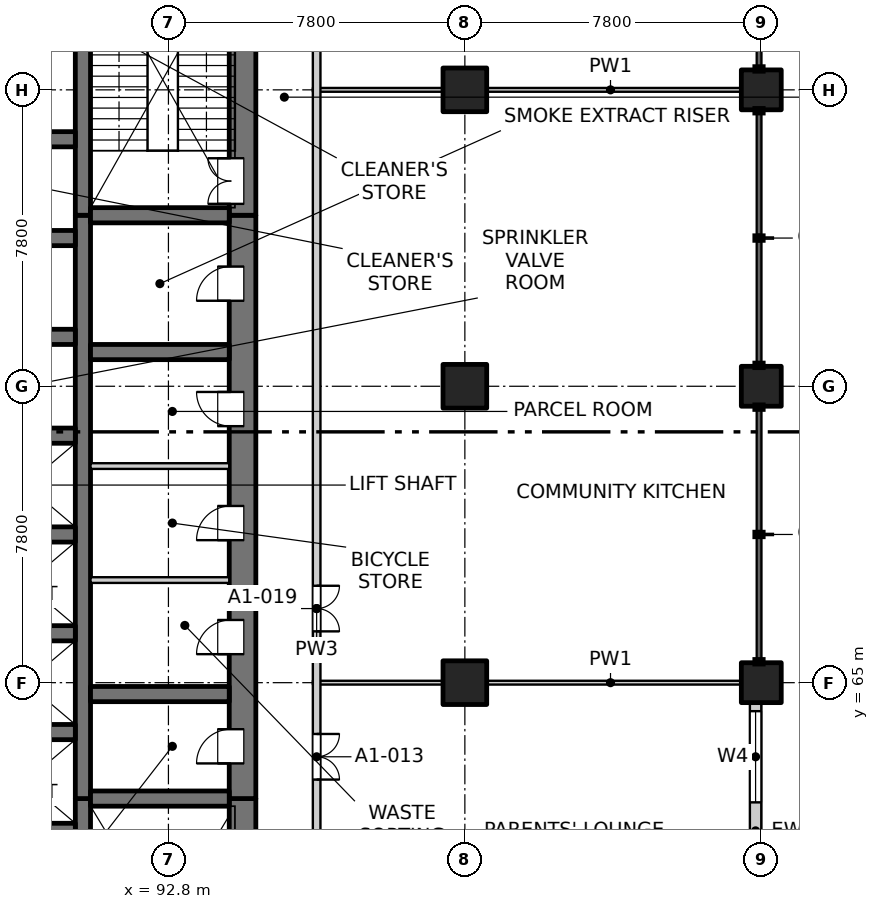
"""IFC4 building model, lengths in metres.
Left out: names, types, materials, properties, quantities, classifications, styles, units other than length and angle.
Written with IfcOpenShell. Run it as: python <this file> out.ifc"""

import sys

from ifc_helpers import new_model, si_unit, direction, frame, frame_2d, origin, origin_2d, place, context, subcontext, project, spatial, rectangle, extrude, element, fill, save


model = new_model("IFC4")
c1 = context("Model", 3, precision=1e-05, world=origin(), true_north=direction((0.0, 1.0)))
c2 = subcontext(c1, "Body", "Model", "MODEL_VIEW")
j1 = project(units=[si_unit("LENGTHUNIT", "METRE"), si_unit("PLANEANGLEUNIT", "RADIAN")], contexts=[c1])
p1 = place(None, origin())
s1 = spatial("IfcSite", under=j1, at=p1, CompositionType="ELEMENT")
p2 = place(p1, origin())
s2 = spatial("IfcBuilding", under=s1, at=p2, CompositionType="ELEMENT")
p3 = place(p2, frame((0.0, 0.0, 15.0)))
s3 = spatial("IfcBuildingStorey", under=s2, at=p3, CompositionType="ELEMENT", Elevation=15.0)
for number, where, z_axis, x_axis in (
    (1, (108.4, 65.0, -0.35), (0.0, 0.0, 1.0), (1.0, 0.0, 0.0)),
    (2, (108.4, 72.8, -0.35), (0.0, 0.0, 1.0), (1.0, 0.0, 0.0)),
    (3, (108.4, 80.6, -0.35), (0.0, 0.0, 1.0), (1.0, 0.0, 0.0)),
):
    element("IfcColumn", number, at=place(p3, frame(where, z_axis=z_axis, x_axis=x_axis)), inside=s3, PredefinedType="COLUMN", context=c2, shape_type="SweptSolid", body=[
        extrude(rectangle(XDim=1.05, YDim=1.05, at=origin_2d()), origin(), (0.0, 0.0, 1.0), 4.6),
    ])
for number, where, z_axis, x_axis in (
    (4, (100.6, 65.0, -0.35), (0.0, 0.0, 1.0), (1.0, 0.0, 0.0)),
    (5, (100.6, 72.8, -0.35), (0.0, 0.0, 1.0), (1.0, 0.0, 0.0)),
    (6, (100.6, 80.6, -0.35), (0.0, 0.0, 1.0), (1.0, 0.0, 0.0)),
):
    element("IfcColumn", number, at=place(p3, frame(where, z_axis=z_axis, x_axis=x_axis)), inside=s3, PredefinedType="COLUMN", context=c2, shape_type="SweptSolid", body=[
        extrude(rectangle(XDim=1.15, YDim=1.15, at=origin_2d()), origin(), (0.0, 0.0, 1.0), 4.6),
    ])
p4 = place(p3, frame((94.75, 54.9, -0.35), z_axis=(0.0, 0.0, 1.0), x_axis=(0.0, 1.0, 0.0)))
e7 = element("IfcWall", 7, at=p4, inside=s3, PredefinedType="SOLIDWALL", context=c2, shape_type="SweptSolid", body=[
    extrude(rectangle(XDim=7.05, YDim=0.7, at=frame_2d((3.525, 0.0))), origin(), (0.0, 0.0, 1.0), 4.6),
])
p5 = place(p4, frame((0.75, 0.0, 0.35)))
e8 = element("IfcOpeningElement", 8, at=p5, cuts=e7, PredefinedType="OPENING", context=c2, shape_type="SweptSolid", body=[
    extrude(rectangle(XDim=1.2, YDim=2.1, at=frame_2d((0.6, 1.05))), frame((0.0, 0.36, 0.0), z_axis=(0.0, -1.0, 0.0), x_axis=(1.0, 0.0, 0.0)), (0.0, 0.0, 1.0), 0.72),
])
p6 = place(p3, frame((94.75, 61.95, -0.35), z_axis=(0.0, 0.0, 1.0), x_axis=(0.0, 1.0, 0.0)))
e9 = element("IfcWall", 9, at=p6, inside=s3, PredefinedType="SOLIDWALL", context=c2, shape_type="SweptSolid", body=[
    extrude(rectangle(XDim=15.35, YDim=0.7, at=frame_2d((7.675, 0.0))), origin(), (0.0, 0.0, 1.0), 4.6),
])
p7 = place(p6, frame((0.925, 0.0, 0.35)))
e10 = element("IfcOpeningElement", 10, at=p7, cuts=e9, PredefinedType="OPENING", context=c2, shape_type="SweptSolid", body=[
    extrude(rectangle(XDim=0.9, YDim=2.1, at=frame_2d((0.45, 1.05))), frame((0.0, 0.36, 0.0), z_axis=(0.0, -1.0, 0.0), x_axis=(1.0, 0.0, 0.0)), (0.0, 0.0, 1.0), 0.72),
])
p8 = place(p6, frame((3.8, 0.0, 0.35)))
e11 = element("IfcOpeningElement", 11, at=p8, cuts=e9, PredefinedType="OPENING", context=c2, shape_type="SweptSolid", body=[
    extrude(rectangle(XDim=0.9, YDim=2.1, at=frame_2d((0.45, 1.05))), frame((0.0, 0.36, 0.0), z_axis=(0.0, -1.0, 0.0), x_axis=(1.0, 0.0, 0.0)), (0.0, 0.0, 1.0), 0.72),
])
p9 = place(p6, frame((6.8, 0.0, 0.35)))
e12 = element("IfcOpeningElement", 12, at=p9, cuts=e9, PredefinedType="OPENING", context=c2, shape_type="SweptSolid", body=[
    extrude(rectangle(XDim=0.9, YDim=2.1, at=frame_2d((0.45, 1.05))), frame((0.0, 0.36, 0.0), z_axis=(0.0, -1.0, 0.0), x_axis=(1.0, 0.0, 0.0)), (0.0, 0.0, 1.0), 0.72),
])
p10 = place(p6, frame((9.8, 0.0, 0.35)))
e13 = element("IfcOpeningElement", 13, at=p10, cuts=e9, PredefinedType="OPENING", context=c2, shape_type="SweptSolid", body=[
    extrude(rectangle(XDim=0.9, YDim=2.1, at=frame_2d((0.45, 1.05))), frame((0.0, 0.36, 0.0), z_axis=(0.0, -1.0, 0.0), x_axis=(1.0, 0.0, 0.0)), (0.0, 0.0, 1.0), 0.72),
])
p11 = place(p6, frame((13.1, 0.0, 0.35)))
e14 = element("IfcOpeningElement", 14, at=p11, cuts=e9, PredefinedType="OPENING", context=c2, shape_type="SweptSolid", body=[
    extrude(rectangle(XDim=0.9, YDim=2.1, at=frame_2d((0.45, 1.05))), frame((0.0, 0.36, 0.0), z_axis=(0.0, -1.0, 0.0), x_axis=(1.0, 0.0, 0.0)), (0.0, 0.0, 1.0), 0.72),
])
p12 = place(p3, frame((94.75, 77.3, -0.35), z_axis=(0.0, 0.0, 1.0), x_axis=(0.0, 1.0, 0.0)))
e15 = element("IfcWall", 15, at=p12, inside=s3, PredefinedType="SOLIDWALL", context=c2, shape_type="SweptSolid", body=[
    extrude(rectangle(XDim=7.55, YDim=0.7, at=frame_2d((3.775, 0.0))), origin(), (0.0, 0.0, 1.0), 4.6),
])
p13 = place(p12, frame((0.3, 0.0, 0.35)))
e16 = element("IfcOpeningElement", 16, at=p13, cuts=e15, PredefinedType="OPENING", context=c2, shape_type="SweptSolid", body=[
    extrude(rectangle(XDim=1.2, YDim=2.1, at=frame_2d((0.6, 1.05))), frame((0.0, 0.36, 0.0), z_axis=(0.0, -1.0, 0.0), x_axis=(1.0, 0.0, 0.0)), (0.0, 0.0, 1.0), 0.72),
])
p14 = place(p3, frame((90.55, 55.6, -0.35), z_axis=(0.0, 0.0, 1.0), x_axis=(0.0, 1.0, 0.0)))
e17 = element("IfcWall", 17, at=p14, inside=s3, PredefinedType="SOLIDWALL", context=c2, shape_type="SweptSolid", body=[
    extrude(rectangle(XDim=6.35, YDim=0.4, at=frame_2d((3.175, 0.0))), origin(), (0.0, 0.0, 1.0), 4.6),
])
p15 = place(p14, frame((0.1, 0.0, 0.35)))
e18 = element("IfcOpeningElement", 18, at=p15, cuts=e17, PredefinedType="OPENING", context=c2, shape_type="SweptSolid", body=[
    extrude(rectangle(XDim=1.2, YDim=2.1, at=frame_2d((0.6, 1.05))), frame((0.0, 0.21, 0.0), z_axis=(0.0, -1.0, 0.0), x_axis=(1.0, 0.0, 0.0)), (0.0, 0.0, 1.0), 0.42),
])
p16 = place(p3, frame((90.55, 61.95, -0.35), z_axis=(0.0, 0.0, 1.0), x_axis=(0.0, 1.0, 0.0)))
e19 = element("IfcWall", 19, at=p16, inside=s3, PredefinedType="SOLIDWALL", context=c2, shape_type="SweptSolid", body=[
    extrude(rectangle(XDim=15.35, YDim=0.4, at=frame_2d((7.675, 0.0))), origin(), (0.0, 0.0, 1.0), 4.6),
])
p17 = place(p3, frame((90.55, 77.3, -0.35), z_axis=(0.0, 0.0, 1.0), x_axis=(0.0, 1.0, 0.0)))
e20 = element("IfcWall", 20, at=p17, inside=s3, PredefinedType="SOLIDWALL", context=c2, shape_type="SweptSolid", body=[
    extrude(rectangle(XDim=6.85, YDim=0.4, at=frame_2d((3.425, 0.0))), origin(), (0.0, 0.0, 1.0), 4.6),
])
for number, where, z_axis, x_axis in (
    (21, (87.35, 61.1, -0.35), (0.0, 0.0, 1.0), (1.0, 0.0, 0.0)),
    (22, (87.35, 63.7, -0.35), (0.0, 0.0, 1.0), (1.0, 0.0, 0.0)),
    (23, (87.35, 66.3, -0.35), (0.0, 0.0, 1.0), (1.0, 0.0, 0.0)),
    (24, (87.35, 68.9, -0.35), (0.0, 0.0, 1.0), (1.0, 0.0, 0.0)),
    (25, (87.35, 71.5, -0.35), (0.0, 0.0, 1.0), (1.0, 0.0, 0.0)),
    (26, (87.35, 74.1, -0.35), (0.0, 0.0, 1.0), (1.0, 0.0, 0.0)),
    (27, (87.35, 76.7, -0.35), (0.0, 0.0, 1.0), (1.0, 0.0, 0.0)),
    (28, (87.35, 79.3, -0.35), (0.0, 0.0, 1.0), (1.0, 0.0, 0.0)),
):
    element("IfcWall", number, at=place(p3, frame(where, z_axis=z_axis, x_axis=x_axis)), inside=s3, PredefinedType="SOLIDWALL", context=c2, shape_type="SweptSolid", body=[
        extrude(rectangle(XDim=3.0, YDim=0.4, at=frame_2d((1.5, 0.0))), origin(), (0.0, 0.0, 1.0), 4.6),
    ])
for number, where, z_axis, x_axis in (
    (29, (90.75, 61.95, -0.35), (0.0, 0.0, 1.0), (1.0, 0.0, 0.0)),
    (30, (90.75, 64.7, -0.35), (0.0, 0.0, 1.0), (1.0, 0.0, 0.0)),
    (31, (90.75, 73.7, -0.35), (0.0, 0.0, 1.0), (1.0, 0.0, 0.0)),
    (32, (90.75, 77.3, -0.35), (0.0, 0.0, 1.0), (1.0, 0.0, 0.0)),
):
    element("IfcWall", number, at=place(p3, frame(where, z_axis=z_axis, x_axis=x_axis)), inside=s3, PredefinedType="SOLIDWALL", context=c2, shape_type="SweptSolid", body=[
        extrude(rectangle(XDim=3.65, YDim=0.4, at=frame_2d((1.825, 0.0))), origin(), (0.0, 0.0, 1.0), 4.6),
    ])
p18 = place(p3, frame((108.25, 57.725, 0.0), z_axis=(0.0, 0.0, 1.0), x_axis=(0.0, 1.0, 0.0)))
e33 = element("IfcWall", 33, at=p18, inside=s3, PredefinedType="SOLIDWALL", context=c2, shape_type="SweptSolid", body=[
    extrude(rectangle(XDim=6.75, YDim=0.3, at=frame_2d((3.375, 0.0))), origin(), (0.0, 0.0, 1.0), 3.8),
])
p19 = place(p18, frame((0.375, 0.0, 0.0)))
e34 = element("IfcOpeningElement", 34, at=p19, cuts=e33, PredefinedType="OPENING", context=c2, shape_type="SweptSolid", body=[
    extrude(rectangle(XDim=2.1, YDim=2.4, at=frame_2d((1.05, 1.2))), frame((0.0, 0.16, 0.0), z_axis=(0.0, -1.0, 0.0), x_axis=(1.0, 0.0, 0.0)), (0.0, 0.0, 1.0), 0.32),
])
p20 = place(p18, frame((4.125, 0.0, 0.6)))
e35 = element("IfcOpeningElement", 35, at=p20, cuts=e33, PredefinedType="OPENING", context=c2, shape_type="SweptSolid", body=[
    extrude(rectangle(XDim=2.4, YDim=2.1, at=frame_2d((1.2, 1.05))), frame((0.0, 0.16, 0.0), z_axis=(0.0, -1.0, 0.0), x_axis=(1.0, 0.0, 0.0)), (0.0, 0.0, 1.0), 0.32),
])
p21 = place(p3, frame((96.6, 65.0, 0.0), z_axis=(0.0, 0.0, 1.0), x_axis=(1.0, 0.0, 0.0)))
e36 = element("IfcWall", 36, at=p21, inside=s3, PredefinedType="PARTITIONING", context=c2, shape_type="SweptSolid", body=[
    extrude(rectangle(XDim=4.0, YDim=0.1, at=frame_2d((2.0, 0.0))), origin(), (0.0, 0.0, 1.0), 4.25),
])
p22 = place(p3, frame((100.6, 65.0, 0.0), z_axis=(0.0, 0.0, 1.0), x_axis=(1.0, 0.0, 0.0)))
e37 = element("IfcWall", 37, at=p22, inside=s3, PredefinedType="PARTITIONING", context=c2, shape_type="SweptSolid", body=[
    extrude(rectangle(XDim=7.665, YDim=0.1, at=frame_2d((3.833, 0.0))), origin(), (0.0, 0.0, 1.0), 3.65),
])
for number, where, z_axis, x_axis in (
    (38, (90.75, 67.7, 0.0), (0.0, 0.0, 1.0), (1.0, 0.0, 0.0)),
    (39, (90.75, 70.7, 0.0), (0.0, 0.0, 1.0), (1.0, 0.0, 0.0)),
):
    element("IfcWall", number, at=place(p3, frame(where, z_axis=z_axis, x_axis=x_axis)), inside=s3, PredefinedType="PARTITIONING", context=c2, shape_type="SweptSolid", body=[
        extrude(rectangle(XDim=3.65, YDim=0.15, at=frame_2d((1.825, 0.0))), origin(), (0.0, 0.0, 1.0), 4.25),
    ])
p23 = place(p3, frame((96.6, 80.6, 0.0), z_axis=(0.0, 0.0, 1.0), x_axis=(1.0, 0.0, 0.0)))
e40 = element("IfcWall", 40, at=p23, inside=s3, PredefinedType="PARTITIONING", context=c2, shape_type="SweptSolid", body=[
    extrude(rectangle(XDim=4.0, YDim=0.1, at=frame_2d((2.0, 0.0))), origin(), (0.0, 0.0, 1.0), 4.25),
])
p24 = place(p3, frame((100.6, 80.6, 0.0), z_axis=(0.0, 0.0, 1.0), x_axis=(1.0, 0.0, 0.0)))
e41 = element("IfcWall", 41, at=p24, inside=s3, PredefinedType="PARTITIONING", context=c2, shape_type="SweptSolid", body=[
    extrude(rectangle(XDim=7.665, YDim=0.1, at=frame_2d((3.833, 0.0))), origin(), (0.0, 0.0, 1.0), 3.65),
])
p25 = place(p3, frame((96.7, 49.5, 0.0), z_axis=(0.0, 0.0, 1.0), x_axis=(0.0, 1.0, 0.0)))
e42 = element("IfcWall", 42, at=p25, inside=s3, PredefinedType="PARTITIONING", context=c2, shape_type="SweptSolid", body=[
    extrude(rectangle(XDim=34.9, YDim=0.2, at=frame_2d((17.45, 0.0))), origin(), (0.0, 0.0, 1.0), 4.25),
])
p26 = place(p25, frame((6.2, 0.0, 0.0)))
e43 = element("IfcOpeningElement", 43, at=p26, cuts=e42, PredefinedType="OPENING", context=c2, shape_type="SweptSolid", body=[
    extrude(rectangle(XDim=1.2, YDim=2.1, at=frame_2d((0.6, 1.05))), frame((0.0, 0.11, 0.0), z_axis=(0.0, -1.0, 0.0), x_axis=(1.0, 0.0, 0.0)), (0.0, 0.0, 1.0), 0.22),
])
p27 = place(p25, frame((12.95, 0.0, 0.0)))
e44 = element("IfcOpeningElement", 44, at=p27, cuts=e42, PredefinedType="OPENING", context=c2, shape_type="SweptSolid", body=[
    extrude(rectangle(XDim=1.2, YDim=2.1, at=frame_2d((0.6, 1.05))), frame((0.0, 0.11, 0.0), z_axis=(0.0, -1.0, 0.0), x_axis=(1.0, 0.0, 0.0)), (0.0, 0.0, 1.0), 0.22),
])
p28 = place(p25, frame((16.85, 0.0, 0.0)))
e45 = element("IfcOpeningElement", 45, at=p28, cuts=e42, PredefinedType="OPENING", context=c2, shape_type="SweptSolid", body=[
    extrude(rectangle(XDim=1.2, YDim=2.1, at=frame_2d((0.6, 1.05))), frame((0.0, 0.11, 0.0), z_axis=(0.0, -1.0, 0.0), x_axis=(1.0, 0.0, 0.0)), (0.0, 0.0, 1.0), 0.22),
])
p29 = place(p25, frame((32.45, 0.0, 0.0)))
e46 = element("IfcOpeningElement", 46, at=p29, cuts=e42, PredefinedType="OPENING", context=c2, shape_type="SweptSolid", body=[
    extrude(rectangle(XDim=1.2, YDim=2.1, at=frame_2d((0.6, 1.05))), frame((0.0, 0.11, 0.0), z_axis=(0.0, -1.0, 0.0), x_axis=(1.0, 0.0, 0.0)), (0.0, 0.0, 1.0), 0.22),
])
p30 = place(p20, origin())
e47 = element("IfcWindow", 47, at=p30, inside=s3, PartitioningType="SINGLE_PANEL", PredefinedType="WINDOW", context=c2, shape_type="SweptSolid", body=[
    extrude(rectangle(XDim=2.4, YDim=2.1, at=frame_2d((1.2, 1.05))), frame((0.0, 0.03, 0.0), z_axis=(0.0, -1.0, 0.0), x_axis=(1.0, 0.0, 0.0)), (0.0, 0.0, 1.0), 0.06),
])
fill(e35, e47)
p31 = place(p27, origin())
e48 = element("IfcDoor", 48, at=p31, inside=s3, OperationType="DOUBLE_DOOR_SINGLE_SWING", PredefinedType="DOOR", context=c2, shape_type="SweptSolid", body=[
    extrude(rectangle(XDim=1.2, YDim=2.1, at=frame_2d((0.6, 1.05))), frame((0.0, 0.025, 0.0), z_axis=(0.0, -1.0, 0.0), x_axis=(1.0, 0.0, 0.0)), (0.0, 0.0, 1.0), 0.05),
])
fill(e44, e48)
p32 = place(p7, origin())
e49 = element("IfcDoor", 49, at=p32, inside=s3, OperationType="SINGLE_SWING_LEFT", PredefinedType="DOOR", context=c2, shape_type="SweptSolid", body=[
    extrude(rectangle(XDim=0.9, YDim=2.1, at=frame_2d((0.45, 1.05))), frame((0.0, 0.335, 0.0), z_axis=(0.0, -1.0, 0.0), x_axis=(1.0, 0.0, 0.0)), (0.0, 0.0, 1.0), 0.05),
])
fill(e10, e49)
p33 = place(p8, origin())
e50 = element("IfcDoor", 50, at=p33, inside=s3, OperationType="SINGLE_SWING_LEFT", PredefinedType="DOOR", context=c2, shape_type="SweptSolid", body=[
    extrude(rectangle(XDim=0.9, YDim=2.1, at=frame_2d((0.45, 1.05))), frame((0.0, 0.335, 0.0), z_axis=(0.0, -1.0, 0.0), x_axis=(1.0, 0.0, 0.0)), (0.0, 0.0, 1.0), 0.05),
])
fill(e11, e50)
p34 = place(p28, origin())
e51 = element("IfcDoor", 51, at=p34, inside=s3, OperationType="DOUBLE_DOOR_SINGLE_SWING", PredefinedType="DOOR", context=c2, shape_type="SweptSolid", body=[
    extrude(rectangle(XDim=1.2, YDim=2.1, at=frame_2d((0.6, 1.05))), frame((0.0, 0.025, 0.0), z_axis=(0.0, -1.0, 0.0), x_axis=(1.0, 0.0, 0.0)), (0.0, 0.0, 1.0), 0.05),
])
fill(e45, e51)
p35 = place(p9, origin())
e52 = element("IfcDoor", 52, at=p35, inside=s3, OperationType="SINGLE_SWING_LEFT", PredefinedType="DOOR", context=c2, shape_type="SweptSolid", body=[
    extrude(rectangle(XDim=0.9, YDim=2.1, at=frame_2d((0.45, 1.05))), frame((0.0, 0.335, 0.0), z_axis=(0.0, -1.0, 0.0), x_axis=(1.0, 0.0, 0.0)), (0.0, 0.0, 1.0), 0.05),
])
fill(e12, e52)
p36 = place(p10, origin())
e53 = element("IfcDoor", 53, at=p36, inside=s3, OperationType="SINGLE_SWING_RIGHT", PredefinedType="DOOR", context=c2, shape_type="SweptSolid", body=[
    extrude(rectangle(XDim=0.9, YDim=2.1, at=frame_2d((0.45, 1.05))), frame((0.0, 0.335, 0.0), z_axis=(0.0, -1.0, 0.0), x_axis=(1.0, 0.0, 0.0)), (0.0, 0.0, 1.0), 0.05),
])
fill(e13, e53)
p37 = place(p11, origin())
e54 = element("IfcDoor", 54, at=p37, inside=s3, OperationType="SINGLE_SWING_LEFT", PredefinedType="DOOR", context=c2, shape_type="SweptSolid", body=[
    extrude(rectangle(XDim=0.9, YDim=2.1, at=frame_2d((0.45, 1.05))), frame((0.0, 0.335, 0.0), z_axis=(0.0, -1.0, 0.0), x_axis=(1.0, 0.0, 0.0)), (0.0, 0.0, 1.0), 0.05),
])
fill(e14, e54)
p38 = place(p13, origin())
e55 = element("IfcDoor", 55, at=p38, inside=s3, OperationType="DOUBLE_DOOR_SINGLE_SWING", PredefinedType="DOOR", context=c2, shape_type="SweptSolid", body=[
    extrude(rectangle(XDim=1.2, YDim=2.1, at=frame_2d((0.6, 1.05))), frame((0.0, 0.335, 0.0), z_axis=(0.0, -1.0, 0.0), x_axis=(1.0, 0.0, 0.0)), (0.0, 0.0, 1.0), 0.05),
])
fill(e16, e55)
save(model, sys.argv[1])
